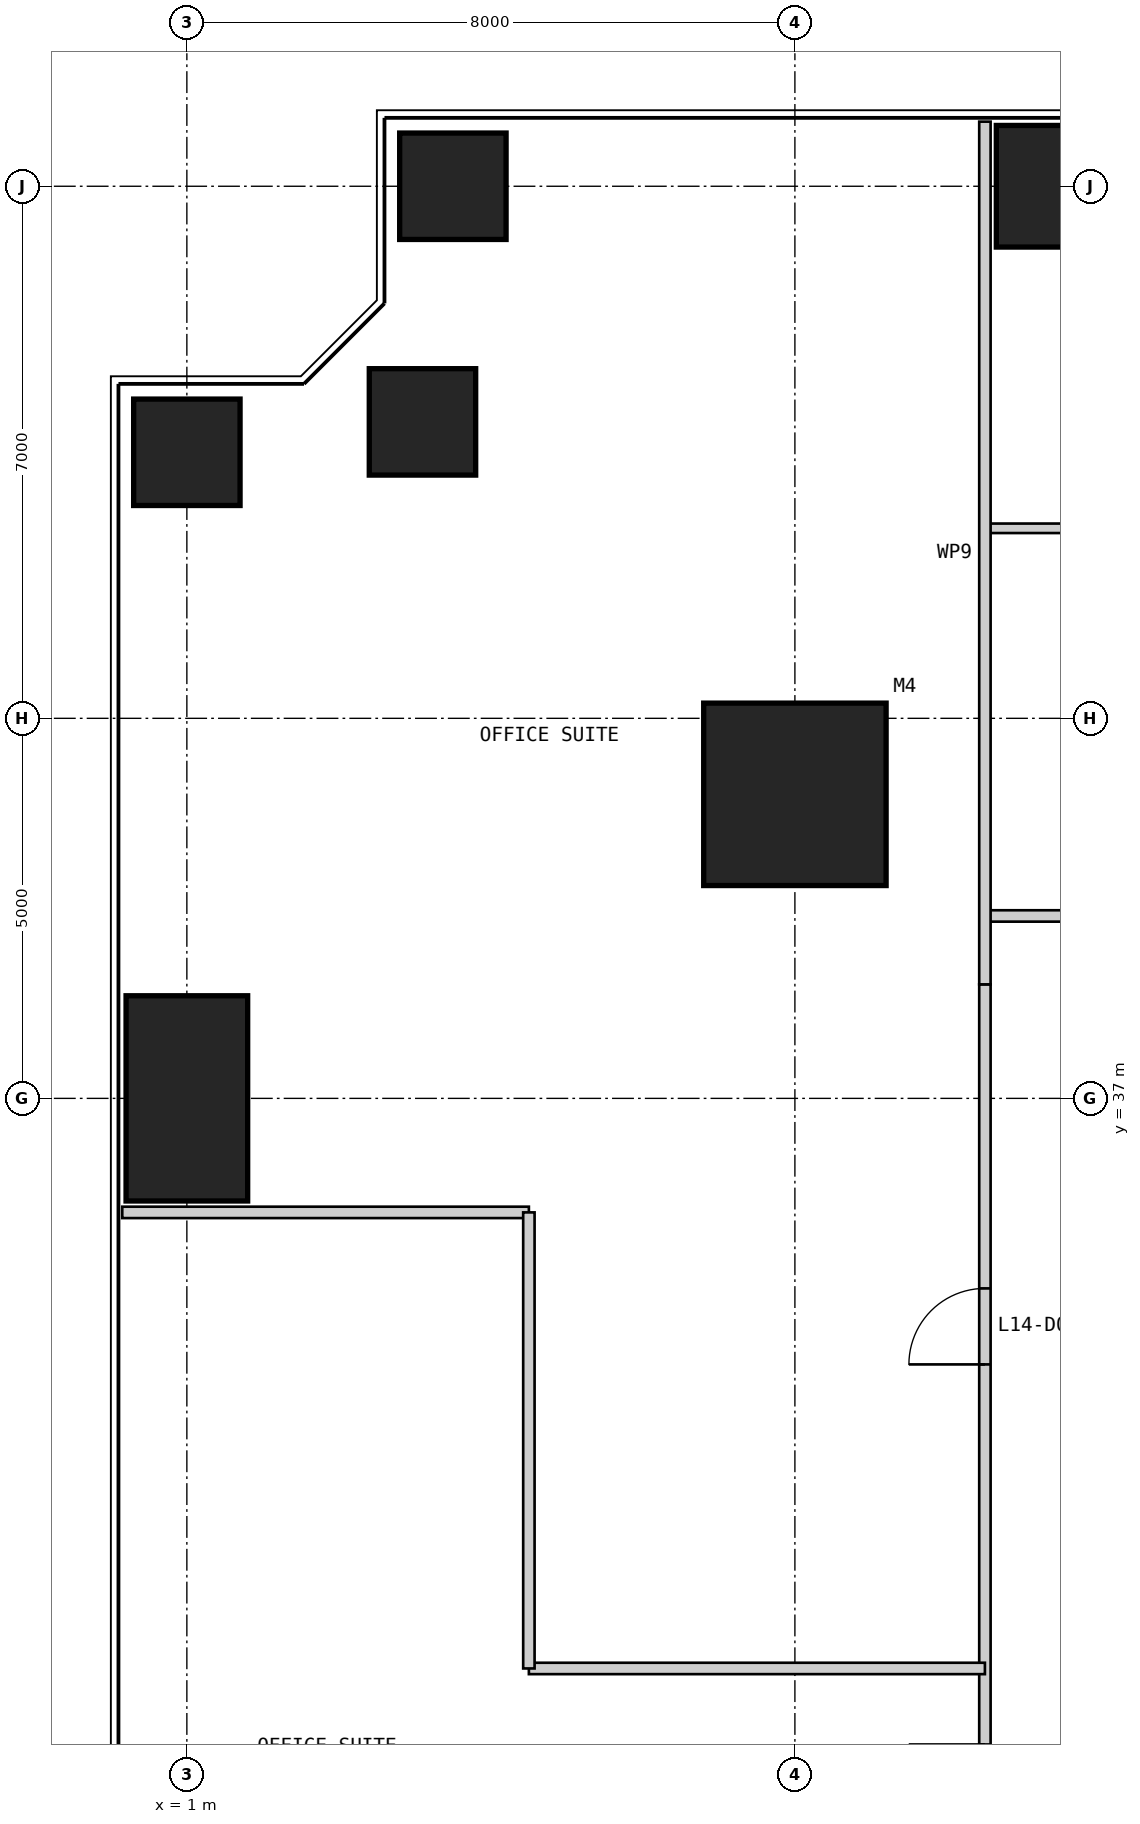
"""IFC4 building model, lengths in metres.
Left out: names, types, materials, properties, quantities, classifications, styles, units other than length and angle.
Written with IfcOpenShell. Run it as: python <this file> out.ifc"""

import sys

from ifc_helpers import new_model, si_unit, direction, frame, frame_2d, origin, origin_2d, place, context, subcontext, project, spatial, rectangle, extrude, element, fill, save


model = new_model("IFC4")
c1 = context("Model", 3, precision=1e-05, world=origin(), true_north=direction((0.0, 1.0)))
c2 = subcontext(c1, "Body", "Model", "MODEL_VIEW")
j1 = project(units=[si_unit("LENGTHUNIT", "METRE"), si_unit("PLANEANGLEUNIT", "RADIAN")], contexts=[c1])
p1 = place(None, origin())
s1 = spatial("IfcSite", under=j1, at=p1, CompositionType="ELEMENT")
p2 = place(p1, origin())
s2 = spatial("IfcBuilding", under=s1, at=p2, CompositionType="ELEMENT")
p3 = place(p2, frame((0.0, 0.0, 63.0)))
s3 = spatial("IfcBuildingStorey", under=s2, at=p3, CompositionType="ELEMENT", Elevation=63.0)
p4 = place(p3, frame((9.0, 41.0, 0.0), z_axis=(0.0, 0.0, 1.0), x_axis=(1.0, 0.0, 0.0)))
e1 = element("IfcColumn", 1, at=p4, inside=s3, PredefinedType="COLUMN", context=c2, shape_type="SweptSolid", body=[
    extrude(rectangle(XDim=2.4, YDim=2.4, at=origin_2d()), origin(), (0.0, 0.0, 1.0), 4.0),
])
p5 = place(p3, frame((13.0, 49.0, 0.0), z_axis=(0.0, 0.0, 1.0), x_axis=(1.0, 0.0, 0.0)))
e2 = element("IfcColumn", 2, at=p5, inside=s3, PredefinedType="COLUMN", context=c2, shape_type="SweptSolid", body=[
    extrude(rectangle(XDim=2.7, YDim=1.6, at=origin_2d()), origin(), (0.0, 0.0, 1.0), 4.0),
])
for number, where, z_axis, x_axis in (
    (3, (4.5, 49.0, 0.0), (0.0, 0.0, 1.0), (1.0, 0.0, 0.0)),
    (4, (4.1, 45.9, 0.0), (0.0, 0.0, 1.0), (1.0, 0.0, 0.0)),
    (5, (1.0, 45.5, 0.0), (0.0, 0.0, 1.0), (1.0, 0.0, 0.0)),
):
    element("IfcColumn", number, at=place(p3, frame(where, z_axis=z_axis, x_axis=x_axis)), inside=s3, PredefinedType="COLUMN", context=c2, shape_type="SweptSolid", body=[
        extrude(rectangle(XDim=1.4, YDim=1.4, at=origin_2d()), origin(), (0.0, 0.0, 1.0), 4.0),
    ])
p6 = place(p3, frame((1.0, 37.0, 0.0), z_axis=(0.0, 0.0, 1.0), x_axis=(1.0, 0.0, 0.0)))
e6 = element("IfcColumn", 6, at=p6, inside=s3, PredefinedType="COLUMN", context=c2, shape_type="SweptSolid", body=[
    extrude(rectangle(XDim=1.6, YDim=2.7, at=origin_2d()), origin(), (0.0, 0.0, 1.0), 4.0),
])
p7 = place(p3, frame((39.4, 39.4, 0.0), z_axis=(0.0, 0.0, 1.0), x_axis=(-1.0, 0.0, 0.0)))
e7 = element("IfcWall", 7, at=p7, inside=s3, PredefinedType="PARTITIONING", context=c2, shape_type="SweptSolid", body=[
    extrude(rectangle(XDim=27.9, YDim=0.15, at=frame_2d((13.95, 0.0))), origin(), (0.0, 0.0, 1.0), 3.85),
])
p8 = place(p7, frame((1.15, 0.0, 0.0)))
e8 = element("IfcOpeningElement", 8, at=p8, cuts=e7, PredefinedType="OPENING", context=c2, shape_type="SweptSolid", body=[
    extrude(rectangle(XDim=1.0, YDim=2.2, at=frame_2d((0.5, 1.1))), frame((0.0, 0.085, 0.0), z_axis=(0.0, -1.0, 0.0), x_axis=(1.0, 0.0, 0.0)), (0.0, 0.0, 1.0), 0.17),
])
p9 = place(p7, frame((23.65, 0.0, 0.0)))
e9 = element("IfcOpeningElement", 9, at=p9, cuts=e7, PredefinedType="OPENING", context=c2, shape_type="SweptSolid", body=[
    extrude(rectangle(XDim=1.0, YDim=2.2, at=frame_2d((0.5, 1.1))), frame((0.0, 0.085, 0.0), z_axis=(0.0, -1.0, 0.0), x_axis=(1.0, 0.0, 0.0)), (0.0, 0.0, 1.0), 0.17),
])
p10 = place(p3, frame((29.5, 44.5, 0.0), z_axis=(0.0, 0.0, 1.0), x_axis=(-1.0, 0.0, 0.0)))
e10 = element("IfcWall", 10, at=p10, inside=s3, PredefinedType="PARTITIONING", context=c2, shape_type="SweptSolid", body=[
    extrude(rectangle(XDim=18.0, YDim=0.125, at=frame_2d((9.0, 0.0))), origin(), (0.0, 0.0, 1.0), 3.85),
])
p11 = place(p10, frame((10.0, 0.0, 0.0)))
e11 = element("IfcOpeningElement", 11, at=p11, cuts=e10, PredefinedType="OPENING", context=c2, shape_type="SweptSolid", body=[
    extrude(rectangle(XDim=1.0, YDim=2.2, at=frame_2d((0.5, 1.1))), frame((0.0, 0.073, 0.0), z_axis=(0.0, -1.0, 0.0), x_axis=(1.0, 0.0, 0.0)), (0.0, 0.0, 1.0), 0.145),
])
p12 = place(p10, frame((13.05, 0.0, 0.0)))
e12 = element("IfcOpeningElement", 12, at=p12, cuts=e10, PredefinedType="OPENING", context=c2, shape_type="SweptSolid", body=[
    extrude(rectangle(XDim=0.9, YDim=2.2, at=frame_2d((0.45, 1.1))), frame((0.0, 0.073, 0.0), z_axis=(0.0, -1.0, 0.0), x_axis=(1.0, 0.0, 0.0)), (0.0, 0.0, 1.0), 0.145),
])
p13 = place(p3, frame((11.5, 38.5, 0.0), z_axis=(0.0, 0.0, 1.0), x_axis=(0.0, -1.0, 0.0)))
e13 = element("IfcWall", 13, at=p13, inside=s3, PredefinedType="PARTITIONING", context=c2, shape_type="SweptSolid", body=[
    extrude(rectangle(XDim=27.0, YDim=0.15, at=frame_2d((13.5, 0.0))), origin(), (0.0, 0.0, 1.0), 3.85),
])
p14 = place(p13, frame((4.0, 0.0, 0.0)))
e14 = element("IfcOpeningElement", 14, at=p14, cuts=e13, PredefinedType="OPENING", context=c2, shape_type="SweptSolid", body=[
    extrude(rectangle(XDim=1.0, YDim=2.2, at=frame_2d((0.5, 1.1))), frame((0.0, 0.085, 0.0), z_axis=(0.0, -1.0, 0.0), x_axis=(1.0, 0.0, 0.0)), (0.0, 0.0, 1.0), 0.17),
])
p15 = place(p13, frame((10.0, 0.0, 0.0)))
e15 = element("IfcOpeningElement", 15, at=p15, cuts=e13, PredefinedType="OPENING", context=c2, shape_type="SweptSolid", body=[
    extrude(rectangle(XDim=1.0, YDim=2.2, at=frame_2d((0.5, 1.1))), frame((0.0, 0.085, 0.0), z_axis=(0.0, -1.0, 0.0), x_axis=(1.0, 0.0, 0.0)), (0.0, 0.0, 1.0), 0.17),
])
p16 = place(p13, frame((17.5, 0.0, 0.0)))
e16 = element("IfcOpeningElement", 16, at=p16, cuts=e13, PredefinedType="OPENING", context=c2, shape_type="SweptSolid", body=[
    extrude(rectangle(XDim=1.0, YDim=2.2, at=frame_2d((0.5, 1.1))), frame((0.0, 0.085, 0.0), z_axis=(0.0, -1.0, 0.0), x_axis=(1.0, 0.0, 0.0)), (0.0, 0.0, 1.0), 0.17),
])
p17 = place(p13, frame((23.5, 0.0, 0.0)))
e17 = element("IfcOpeningElement", 17, at=p17, cuts=e13, PredefinedType="OPENING", context=c2, shape_type="SweptSolid", body=[
    extrude(rectangle(XDim=1.0, YDim=2.2, at=frame_2d((0.5, 1.1))), frame((0.0, 0.085, 0.0), z_axis=(0.0, -1.0, 0.0), x_axis=(1.0, 0.0, 0.0)), (0.0, 0.0, 1.0), 0.17),
])
p18 = place(p3, frame((11.5, 49.85, 0.0), z_axis=(0.0, 0.0, 1.0), x_axis=(0.0, -1.0, 0.0)))
e18 = element("IfcWall", 18, at=p18, inside=s3, PredefinedType="PARTITIONING", context=c2, shape_type="SweptSolid", body=[
    extrude(rectangle(XDim=11.35, YDim=0.15, at=frame_2d((5.675, 0.0))), origin(), (0.0, 0.0, 1.0), 3.85),
])
p19 = place(p3, frame((0.15, 35.5, 0.0), z_axis=(0.0, 0.0, 1.0), x_axis=(1.0, 0.0, 0.0)))
e19 = element("IfcWall", 19, at=p19, inside=s3, PredefinedType="PARTITIONING", context=c2, shape_type="SweptSolid", body=[
    extrude(rectangle(XDim=5.35, YDim=0.15, at=frame_2d((2.675, 0.0))), origin(), (0.0, 0.0, 1.0), 3.85),
])
for number, where, z_axis, x_axis in (
    (20, (5.5, 29.5, 0.0), (0.0, 0.0, 1.0), (1.0, 0.0, 0.0)),
    (21, (5.5, 35.5, 0.0), (0.0, 0.0, 1.0), (0.0, -1.0, 0.0)),
):
    element("IfcWall", number, at=place(p3, frame(where, z_axis=z_axis, x_axis=x_axis)), inside=s3, PredefinedType="PARTITIONING", context=c2, shape_type="SweptSolid", body=[
        extrude(rectangle(XDim=6.0, YDim=0.15, at=frame_2d((3.0, 0.0))), origin(), (0.0, 0.0, 1.0), 3.85),
    ])
p20 = place(p14, frame((1.0, 0.0, 0.0), z_axis=(0.0, 0.0, 1.0), x_axis=(-1.0, 0.0, 0.0)))
e22 = element("IfcDoor", 22, at=p20, inside=s3, OperationType="SINGLE_SWING_LEFT", PredefinedType="DOOR", context=c2, shape_type="SweptSolid", body=[
    extrude(rectangle(XDim=1.0, YDim=2.2, at=frame_2d((0.5, 1.1))), frame((0.0, 0.025, 0.0), z_axis=(0.0, -1.0, 0.0), x_axis=(1.0, 0.0, 0.0)), (0.0, 0.0, 1.0), 0.05),
])
fill(e14, e22)
save(model, sys.argv[1])
